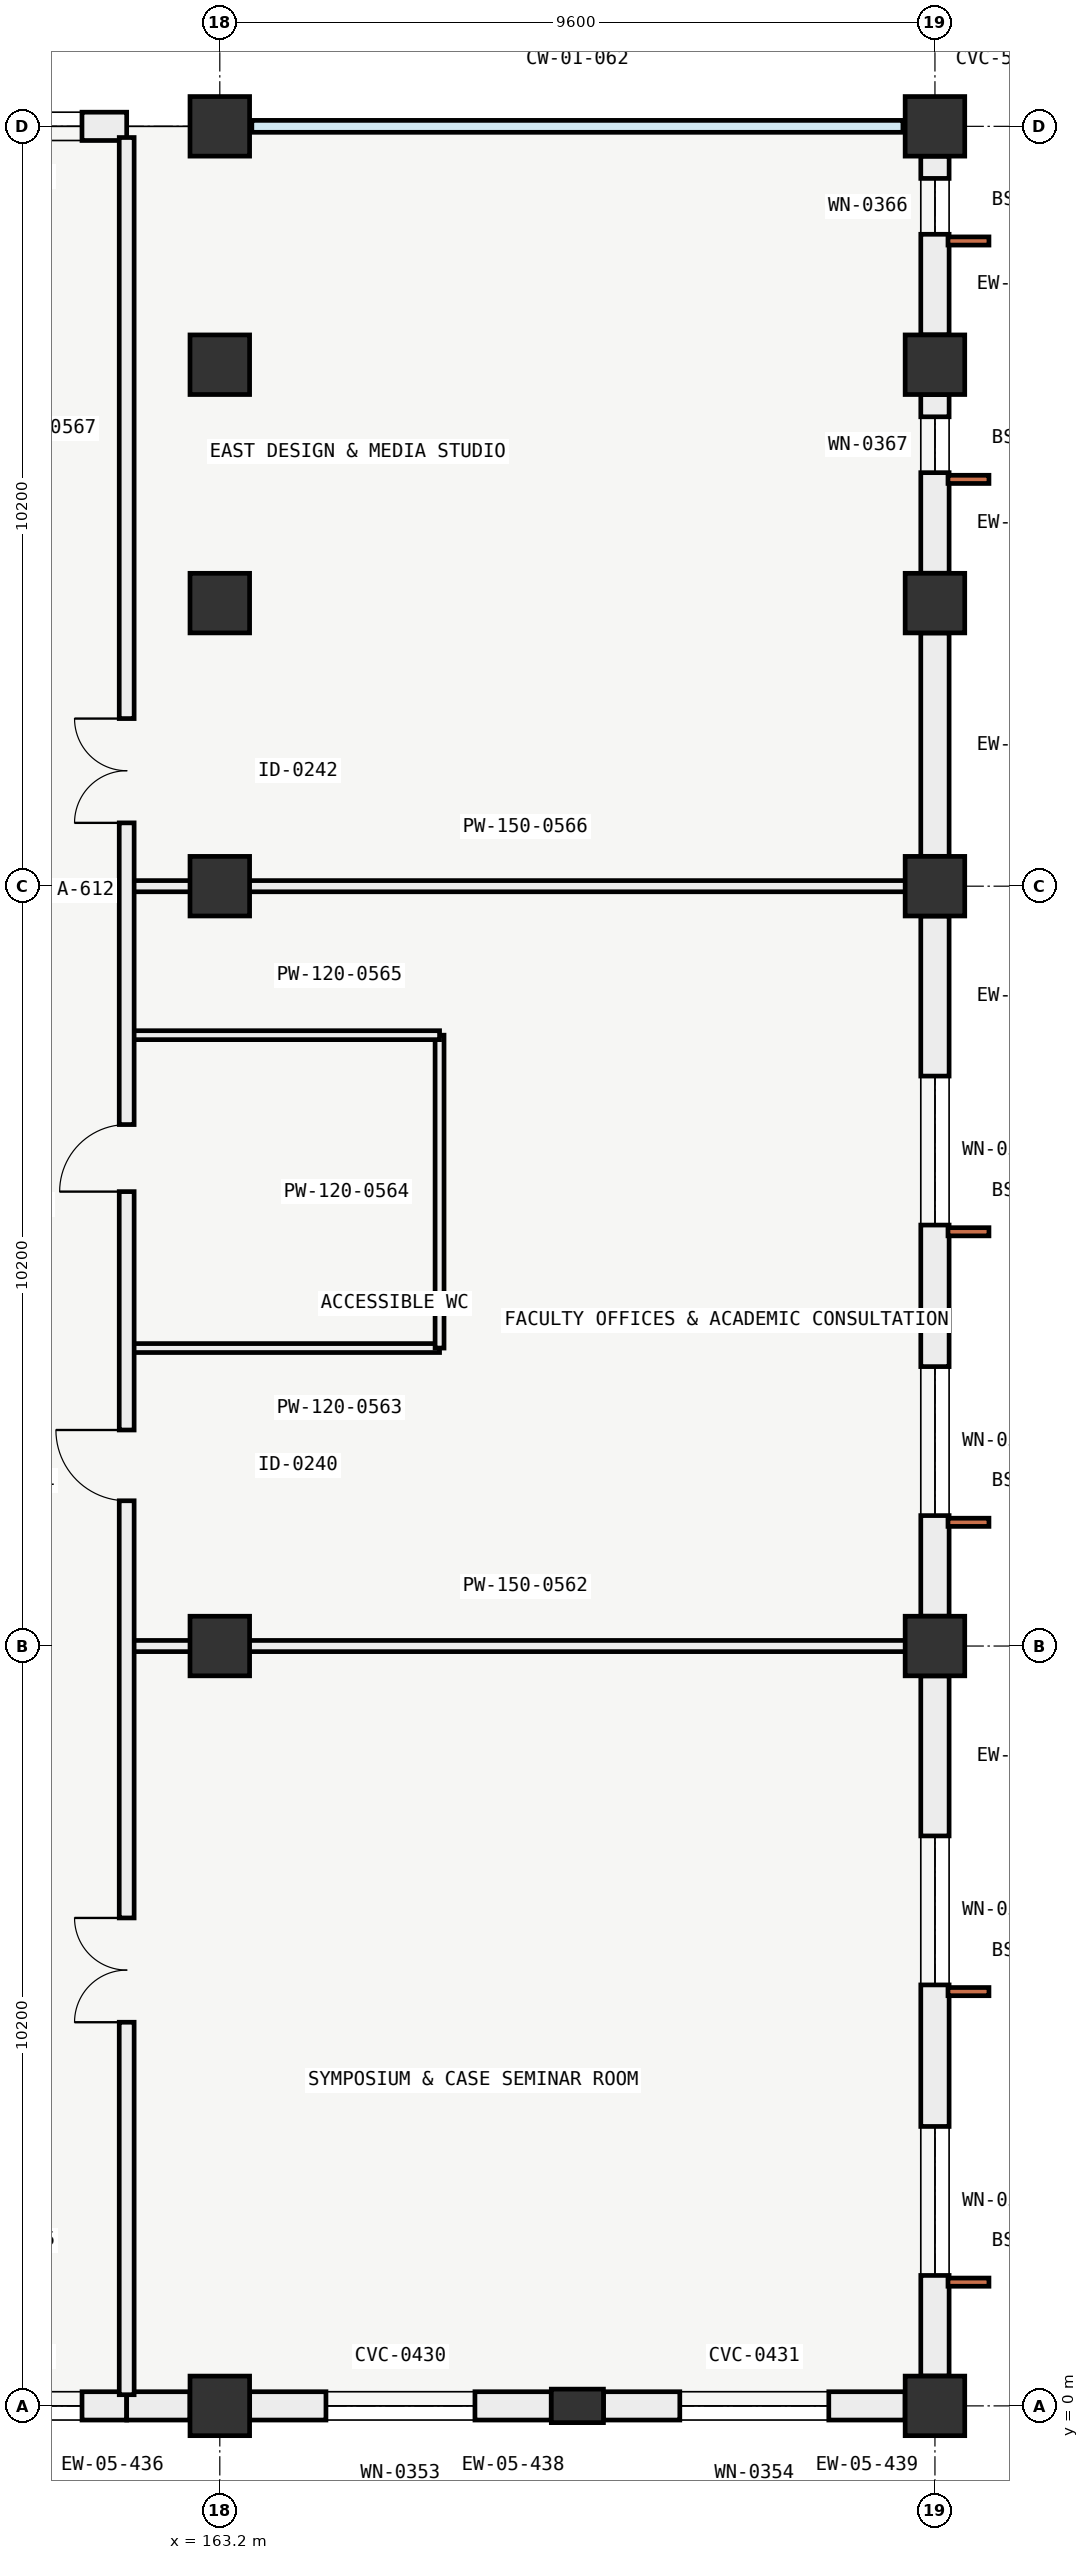
"""IFC4 building model, lengths in metres.
Left out: names, types, materials, properties, quantities, classifications, styles, units other than length and angle.
Written with IfcOpenShell. Run it as: python <this file> out.ifc"""

import sys

from ifc_helpers import new_model, si_unit, direction, frame, frame_2d, origin, origin_2d, place, context, subcontext, project, spatial, rectangle, extrude, element, fill, save


model = new_model("IFC4")
c1 = context("Model", 3, precision=1e-05, world=origin(), true_north=direction((0.0, 1.0)))
c2 = subcontext(c1, "Body", "Model", "MODEL_VIEW")
j1 = project(units=[si_unit("LENGTHUNIT", "METRE"), si_unit("PLANEANGLEUNIT", "RADIAN")], contexts=[c1])
p1 = place(None, origin())
s1 = spatial("IfcSite", under=j1, at=p1, CompositionType="ELEMENT")
p2 = place(p1, origin())
s2 = spatial("IfcBuilding", under=s1, at=p2, CompositionType="ELEMENT")
p3 = place(p2, frame((0.0, 0.0, 5.4)))
s3 = spatial("IfcBuildingStorey", under=s2, at=p3, CompositionType="ELEMENT", Elevation=5.4)
for number, where, z_axis, x_axis in (
    (1, (163.2, 0.0, 0.0), (0.0, 0.0, 1.0), (1.0, 0.0, 0.0)),
    (2, (163.2, 10.2, 0.0), (0.0, 0.0, 1.0), (1.0, 0.0, 0.0)),
    (3, (163.2, 20.4, 0.0), (0.0, 0.0, 1.0), (1.0, 0.0, 0.0)),
    (4, (163.2, 24.2, 0.0), (0.0, 0.0, 1.0), (1.0, 0.0, 0.0)),
    (5, (163.2, 27.4, 0.0), (0.0, 0.0, 1.0), (1.0, 0.0, 0.0)),
    (6, (163.2, 30.6, 0.0), (0.0, 0.0, 1.0), (1.0, 0.0, 0.0)),
    (7, (172.8, 0.0, 0.0), (0.0, 0.0, 1.0), (1.0, 0.0, 0.0)),
    (8, (172.8, 10.2, 0.0), (0.0, 0.0, 1.0), (1.0, 0.0, 0.0)),
    (9, (172.8, 20.4, 0.0), (0.0, 0.0, 1.0), (1.0, 0.0, 0.0)),
    (10, (172.8, 24.2, 0.0), (0.0, 0.0, 1.0), (1.0, 0.0, 0.0)),
    (11, (172.8, 27.4, 0.0), (0.0, 0.0, 1.0), (1.0, 0.0, 0.0)),
    (12, (172.8, 30.6, 0.0), (0.0, 0.0, 1.0), (1.0, 0.0, 0.0)),
):
    element("IfcColumn", number, at=place(p3, frame(where, z_axis=z_axis, x_axis=x_axis)), inside=s3, PredefinedType="COLUMN", context=c2, shape_type="SweptSolid", body=[
        extrude(rectangle(XDim=0.8, YDim=0.8, at=origin_2d()), origin(), (0.0, 0.0, 1.0), 4.2),
    ])
p4 = place(p3, frame((168.0, 0.0, 0.0), z_axis=(0.0, 0.0, 1.0), x_axis=(0.0, 1.0, 0.0)))
e13 = element("IfcColumn", 13, at=p4, inside=s3, PredefinedType="PILASTER", context=c2, shape_type="SweptSolid", body=[
    extrude(rectangle(XDim=0.45, YDim=0.7, at=origin_2d()), origin(), (0.0, 0.0, 1.0), 4.2),
])
p5 = place(p3, frame((161.95, 0.0, 0.0), z_axis=(0.0, 0.0, 1.0), x_axis=(-1.0, 0.0, 0.0)))
e14 = element("IfcWall", 14, at=p5, inside=s3, PredefinedType="SOLIDWALL", context=c2, shape_type="SweptSolid", body=[
    extrude(rectangle(XDim=3.199, YDim=0.38, at=frame_2d((1.6, 0.0))), origin(), (0.0, 0.0, 1.0), 3.25),
])
p6 = place(p5, frame((0.6, 0.0, 0.75)))
e15 = element("IfcOpeningElement", 15, at=p6, cuts=e14, PredefinedType="OPENING", context=c2, shape_type="SweptSolid", body=[
    extrude(rectangle(XDim=2.0, YDim=1.35, at=frame_2d((1.0, 0.675))), frame((0.0, 0.2, 0.0), z_axis=(0.0, -1.0, 0.0), x_axis=(1.0, 0.0, 0.0)), (0.0, 0.0, 1.0), 0.4),
])
p7 = place(p3, frame((162.799, 0.0, 0.0), z_axis=(0.0, 0.0, 1.0), x_axis=(-1.0, 0.0, 0.0)))
e16 = element("IfcWall", 16, at=p7, inside=s3, PredefinedType="SOLIDWALL", context=c2, shape_type="SweptSolid", body=[
    extrude(rectangle(XDim=0.849, YDim=0.38, at=frame_2d((0.425, 0.0))), origin(), (0.0, 0.0, 1.0), 3.25),
])
p8 = place(p3, frame((167.649, 0.0, 0.0), z_axis=(0.0, 0.0, 1.0), x_axis=(-1.0, 0.0, 0.0)))
e17 = element("IfcWall", 17, at=p8, inside=s3, PredefinedType="SOLIDWALL", context=c2, shape_type="SweptSolid", body=[
    extrude(rectangle(XDim=4.048, YDim=0.38, at=frame_2d((2.024, 0.0))), origin(), (0.0, 0.0, 1.0), 3.25),
])
p9 = place(p8, frame((1.024, 0.0, 0.85)))
e18 = element("IfcOpeningElement", 18, at=p9, cuts=e17, PredefinedType="OPENING", context=c2, shape_type="SweptSolid", body=[
    extrude(rectangle(XDim=2.0, YDim=1.35, at=frame_2d((1.0, 0.675))), frame((0.0, 0.2, 0.0), z_axis=(0.0, -1.0, 0.0), x_axis=(1.0, 0.0, 0.0)), (0.0, 0.0, 1.0), 0.4),
])
p10 = place(p3, frame((172.399, 0.0, 0.0), z_axis=(0.0, 0.0, 1.0), x_axis=(-1.0, 0.0, 0.0)))
e19 = element("IfcWall", 19, at=p10, inside=s3, PredefinedType="SOLIDWALL", context=c2, shape_type="SweptSolid", body=[
    extrude(rectangle(XDim=4.048, YDim=0.38, at=frame_2d((2.024, 0.0))), origin(), (0.0, 0.0, 1.0), 3.25),
])
p11 = place(p10, frame((1.024, 0.0, 0.85)))
e20 = element("IfcOpeningElement", 20, at=p11, cuts=e19, PredefinedType="OPENING", context=c2, shape_type="SweptSolid", body=[
    extrude(rectangle(XDim=2.0, YDim=1.35, at=frame_2d((1.0, 0.675))), frame((0.0, 0.2, 0.0), z_axis=(0.0, -1.0, 0.0), x_axis=(1.0, 0.0, 0.0)), (0.0, 0.0, 1.0), 0.4),
])
p12 = place(p3, frame((172.8, 9.799, 0.0), z_axis=(0.0, 0.0, 1.0), x_axis=(0.0, -1.0, 0.0)))
e21 = element("IfcWall", 21, at=p12, inside=s3, PredefinedType="SOLIDWALL", context=c2, shape_type="SweptSolid", body=[
    extrude(rectangle(XDim=9.398, YDim=0.38, at=frame_2d((4.699, 0.0))), origin(), (0.0, 0.0, 1.0), 3.25),
])
p13 = place(p12, frame((6.048, 0.0, 0.85)))
e22 = element("IfcOpeningElement", 22, at=p13, cuts=e21, PredefinedType="OPENING", context=c2, shape_type="SweptSolid", body=[
    extrude(rectangle(XDim=2.0, YDim=1.35, at=frame_2d((1.0, 0.675))), frame((0.0, 0.2, 0.0), z_axis=(0.0, -1.0, 0.0), x_axis=(1.0, 0.0, 0.0)), (0.0, 0.0, 1.0), 0.4),
])
p14 = place(p12, frame((2.148, 0.0, 0.85)))
e23 = element("IfcOpeningElement", 23, at=p14, cuts=e21, PredefinedType="OPENING", context=c2, shape_type="SweptSolid", body=[
    extrude(rectangle(XDim=2.0, YDim=1.35, at=frame_2d((1.0, 0.675))), frame((0.0, 0.2, 0.0), z_axis=(0.0, -1.0, 0.0), x_axis=(1.0, 0.0, 0.0)), (0.0, 0.0, 1.0), 0.4),
])
p15 = place(p3, frame((172.8, 19.999, 0.0), z_axis=(0.0, 0.0, 1.0), x_axis=(0.0, -1.0, 0.0)))
e24 = element("IfcWall", 24, at=p15, inside=s3, PredefinedType="SOLIDWALL", context=c2, shape_type="SweptSolid", body=[
    extrude(rectangle(XDim=9.398, YDim=0.38, at=frame_2d((4.699, 0.0))), origin(), (0.0, 0.0, 1.0), 3.25),
])
p16 = place(p15, frame((6.048, 0.0, 0.85)))
e25 = element("IfcOpeningElement", 25, at=p16, cuts=e24, PredefinedType="OPENING", context=c2, shape_type="SweptSolid", body=[
    extrude(rectangle(XDim=2.0, YDim=1.35, at=frame_2d((1.0, 0.675))), frame((0.0, 0.2, 0.0), z_axis=(0.0, -1.0, 0.0), x_axis=(1.0, 0.0, 0.0)), (0.0, 0.0, 1.0), 0.4),
])
p17 = place(p15, frame((2.148, 0.0, 0.85)))
e26 = element("IfcOpeningElement", 26, at=p17, cuts=e24, PredefinedType="OPENING", context=c2, shape_type="SweptSolid", body=[
    extrude(rectangle(XDim=2.0, YDim=1.35, at=frame_2d((1.0, 0.675))), frame((0.0, 0.2, 0.0), z_axis=(0.0, -1.0, 0.0), x_axis=(1.0, 0.0, 0.0)), (0.0, 0.0, 1.0), 0.4),
])
p18 = place(p3, frame((172.8, 30.199, 0.0), z_axis=(0.0, 0.0, 1.0), x_axis=(0.0, -1.0, 0.0)))
e27 = element("IfcWall", 27, at=p18, inside=s3, PredefinedType="SOLIDWALL", context=c2, shape_type="SweptSolid", body=[
    extrude(rectangle(XDim=2.398, YDim=0.38, at=frame_2d((1.199, 0.0))), origin(), (0.0, 0.0, 1.0), 3.25),
])
p19 = place(p18, frame((0.298, 0.0, 0.85)))
e28 = element("IfcOpeningElement", 28, at=p19, cuts=e27, PredefinedType="OPENING", context=c2, shape_type="SweptSolid", body=[
    extrude(rectangle(XDim=0.75, YDim=1.1, at=frame_2d((0.375, 0.55))), frame((0.0, 0.2, 0.0), z_axis=(0.0, -1.0, 0.0), x_axis=(1.0, 0.0, 0.0)), (0.0, 0.0, 1.0), 0.4),
])
p20 = place(p3, frame((172.8, 26.999, 0.0), z_axis=(0.0, 0.0, 1.0), x_axis=(0.0, -1.0, 0.0)))
e29 = element("IfcWall", 29, at=p20, inside=s3, PredefinedType="SOLIDWALL", context=c2, shape_type="SweptSolid", body=[
    extrude(rectangle(XDim=2.398, YDim=0.38, at=frame_2d((1.199, 0.0))), origin(), (0.0, 0.0, 1.0), 3.25),
])
p21 = place(p20, frame((0.298, 0.0, 0.85)))
e30 = element("IfcOpeningElement", 30, at=p21, cuts=e29, PredefinedType="OPENING", context=c2, shape_type="SweptSolid", body=[
    extrude(rectangle(XDim=0.75, YDim=1.1, at=frame_2d((0.375, 0.55))), frame((0.0, 0.2, 0.0), z_axis=(0.0, -1.0, 0.0), x_axis=(1.0, 0.0, 0.0)), (0.0, 0.0, 1.0), 0.4),
])
p22 = place(p3, frame((172.8, 23.799, 0.0), z_axis=(0.0, 0.0, 1.0), x_axis=(0.0, -1.0, 0.0)))
e31 = element("IfcWall", 31, at=p22, inside=s3, PredefinedType="SOLIDWALL", context=c2, shape_type="SweptSolid", body=[
    extrude(rectangle(XDim=2.998, YDim=0.38, at=frame_2d((1.499, 0.0))), origin(), (0.0, 0.0, 1.0), 3.25),
])
p23 = place(p3, frame((158.75, 30.6, 0.0), z_axis=(0.0, 0.0, 1.0), x_axis=(1.0, 0.0, 0.0)))
e32 = element("IfcWall", 32, at=p23, inside=s3, PredefinedType="SOLIDWALL", context=c2, shape_type="SweptSolid", body=[
    extrude(rectangle(XDim=3.2, YDim=0.38, at=frame_2d((1.6, 0.0))), origin(), (0.0, 0.0, 1.0), 3.25),
])
p24 = place(p23, frame((0.6, 0.0, 0.75)))
e33 = element("IfcOpeningElement", 33, at=p24, cuts=e32, PredefinedType="OPENING", context=c2, shape_type="SweptSolid", body=[
    extrude(rectangle(XDim=2.0, YDim=1.35, at=frame_2d((1.0, 0.675))), frame((0.0, 0.2, 0.0), z_axis=(0.0, -1.0, 0.0), x_axis=(1.0, 0.0, 0.0)), (0.0, 0.0, 1.0), 0.4),
])
p25 = place(p3, frame((161.95, 10.2, 0.0), z_axis=(0.0, 0.0, 1.0), x_axis=(1.0, 0.0, 0.0)))
e34 = element("IfcWall", 34, at=p25, inside=s3, PredefinedType="PARTITIONING", context=c2, shape_type="SweptSolid", body=[
    extrude(rectangle(XDim=10.7, YDim=0.15, at=frame_2d((5.35, 0.0))), origin(), (0.0, 0.0, 1.0), 3.15),
])
p26 = place(p3, frame((161.95, 14.2, 0.0), z_axis=(0.0, 0.0, 1.0), x_axis=(1.0, 0.0, 0.0)))
e35 = element("IfcWall", 35, at=p26, inside=s3, PredefinedType="PARTITIONING", context=c2, shape_type="SweptSolid", body=[
    extrude(rectangle(XDim=4.2, YDim=0.12, at=frame_2d((2.1, 0.0))), origin(), (0.0, 0.0, 1.0), 3.25),
])
p27 = place(p3, frame((166.15, 14.2, 0.0), z_axis=(0.0, 0.0, 1.0), x_axis=(0.0, 1.0, 0.0)))
e36 = element("IfcWall", 36, at=p27, inside=s3, PredefinedType="PARTITIONING", context=c2, shape_type="SweptSolid", body=[
    extrude(rectangle(XDim=4.2, YDim=0.12, at=frame_2d((2.1, 0.0))), origin(), (0.0, 0.0, 1.0), 3.85),
])
p28 = place(p3, frame((161.95, 18.4, 0.0), z_axis=(0.0, 0.0, 1.0), x_axis=(1.0, 0.0, 0.0)))
e37 = element("IfcWall", 37, at=p28, inside=s3, PredefinedType="PARTITIONING", context=c2, shape_type="SweptSolid", body=[
    extrude(rectangle(XDim=4.2, YDim=0.12, at=frame_2d((2.1, 0.0))), origin(), (0.0, 0.0, 1.0), 3.25),
])
p29 = place(p3, frame((161.95, 20.4, 0.0), z_axis=(0.0, 0.0, 1.0), x_axis=(1.0, 0.0, 0.0)))
e38 = element("IfcWall", 38, at=p29, inside=s3, PredefinedType="PARTITIONING", context=c2, shape_type="SweptSolid", body=[
    extrude(rectangle(XDim=10.7, YDim=0.15, at=frame_2d((5.35, 0.0))), origin(), (0.0, 0.0, 1.0), 3.2),
])
p30 = place(p3, frame((161.95, 0.15, 0.0), z_axis=(0.0, 0.0, 1.0), x_axis=(0.0, 1.0, 0.0)))
e39 = element("IfcWall", 39, at=p30, inside=s3, PredefinedType="PARTITIONING", context=c2, shape_type="SweptSolid", body=[
    extrude(rectangle(XDim=30.3, YDim=0.2, at=frame_2d((15.15, 0.0))), origin(), (0.0, 0.0, 1.0), 3.15),
])
p31 = place(p30, frame((5.0, 0.0, 0.0)))
e40 = element("IfcOpeningElement", 40, at=p31, cuts=e39, PredefinedType="OPENING", context=c2, shape_type="SweptSolid", body=[
    extrude(rectangle(XDim=1.4, YDim=2.2, at=frame_2d((0.7, 1.1))), frame((0.0, 0.11, 0.0), z_axis=(0.0, -1.0, 0.0), x_axis=(1.0, 0.0, 0.0)), (0.0, 0.0, 1.0), 0.22),
])
p32 = place(p30, frame((12.0, 0.0, 0.0)))
e41 = element("IfcOpeningElement", 41, at=p32, cuts=e39, PredefinedType="OPENING", context=c2, shape_type="SweptSolid", body=[
    extrude(rectangle(XDim=0.95, YDim=2.1, at=frame_2d((0.475, 1.05))), frame((0.0, 0.11, 0.0), z_axis=(0.0, -1.0, 0.0), x_axis=(1.0, 0.0, 0.0)), (0.0, 0.0, 1.0), 0.22),
])
p33 = place(p30, frame((16.15, 0.0, 0.0)))
e42 = element("IfcOpeningElement", 42, at=p33, cuts=e39, PredefinedType="OPENING", context=c2, shape_type="SweptSolid", body=[
    extrude(rectangle(XDim=0.9, YDim=2.05, at=frame_2d((0.45, 1.025))), frame((0.0, 0.11, 0.0), z_axis=(0.0, -1.0, 0.0), x_axis=(1.0, 0.0, 0.0)), (0.0, 0.0, 1.0), 0.22),
])
p34 = place(p30, frame((21.1, 0.0, 0.0)))
e43 = element("IfcOpeningElement", 43, at=p34, cuts=e39, PredefinedType="OPENING", context=c2, shape_type="SweptSolid", body=[
    extrude(rectangle(XDim=1.4, YDim=2.2, at=frame_2d((0.7, 1.1))), frame((0.0, 0.11, 0.0), z_axis=(0.0, -1.0, 0.0), x_axis=(1.0, 0.0, 0.0)), (0.0, 0.0, 1.0), 0.22),
])
p35 = place(p6, origin())
e44 = element("IfcWindow", 44, at=p35, inside=s3, PartitioningType="SINGLE_PANEL", PredefinedType="WINDOW", context=c2, shape_type="SweptSolid", body=[
    extrude(rectangle(XDim=2.0, YDim=1.35, at=frame_2d((1.0, 0.675))), frame((0.0, 0.03, 0.0), z_axis=(0.0, -1.0, 0.0), x_axis=(1.0, 0.0, 0.0)), (0.0, 0.0, 1.0), 0.06),
])
fill(e15, e44)
p36 = place(p9, origin())
e45 = element("IfcWindow", 45, at=p36, inside=s3, PartitioningType="SINGLE_PANEL", PredefinedType="WINDOW", context=c2, shape_type="SweptSolid", body=[
    extrude(rectangle(XDim=2.0, YDim=1.35, at=frame_2d((1.0, 0.675))), frame((0.0, 0.03, 0.0), z_axis=(0.0, -1.0, 0.0), x_axis=(1.0, 0.0, 0.0)), (0.0, 0.0, 1.0), 0.06),
])
fill(e18, e45)
p37 = place(p11, origin())
e46 = element("IfcWindow", 46, at=p37, inside=s3, PartitioningType="SINGLE_PANEL", PredefinedType="WINDOW", context=c2, shape_type="SweptSolid", body=[
    extrude(rectangle(XDim=2.0, YDim=1.35, at=frame_2d((1.0, 0.675))), frame((0.0, 0.03, 0.0), z_axis=(0.0, -1.0, 0.0), x_axis=(1.0, 0.0, 0.0)), (0.0, 0.0, 1.0), 0.06),
])
fill(e20, e46)
p38 = place(p13, origin())
e47 = element("IfcWindow", 47, at=p38, inside=s3, PartitioningType="SINGLE_PANEL", PredefinedType="WINDOW", context=c2, shape_type="SweptSolid", body=[
    extrude(rectangle(XDim=2.0, YDim=1.35, at=frame_2d((1.0, 0.675))), frame((0.0, 0.03, 0.0), z_axis=(0.0, -1.0, 0.0), x_axis=(1.0, 0.0, 0.0)), (0.0, 0.0, 1.0), 0.06),
])
fill(e22, e47)
p39 = place(p14, origin())
e48 = element("IfcWindow", 48, at=p39, inside=s3, PartitioningType="SINGLE_PANEL", PredefinedType="WINDOW", context=c2, shape_type="SweptSolid", body=[
    extrude(rectangle(XDim=2.0, YDim=1.35, at=frame_2d((1.0, 0.675))), frame((0.0, 0.03, 0.0), z_axis=(0.0, -1.0, 0.0), x_axis=(1.0, 0.0, 0.0)), (0.0, 0.0, 1.0), 0.06),
])
fill(e23, e48)
p40 = place(p16, origin())
e49 = element("IfcWindow", 49, at=p40, inside=s3, PartitioningType="SINGLE_PANEL", PredefinedType="WINDOW", context=c2, shape_type="SweptSolid", body=[
    extrude(rectangle(XDim=2.0, YDim=1.35, at=frame_2d((1.0, 0.675))), frame((0.0, 0.03, 0.0), z_axis=(0.0, -1.0, 0.0), x_axis=(1.0, 0.0, 0.0)), (0.0, 0.0, 1.0), 0.06),
])
fill(e25, e49)
p41 = place(p17, origin())
e50 = element("IfcWindow", 50, at=p41, inside=s3, PartitioningType="SINGLE_PANEL", PredefinedType="WINDOW", context=c2, shape_type="SweptSolid", body=[
    extrude(rectangle(XDim=2.0, YDim=1.35, at=frame_2d((1.0, 0.675))), frame((0.0, 0.03, 0.0), z_axis=(0.0, -1.0, 0.0), x_axis=(1.0, 0.0, 0.0)), (0.0, 0.0, 1.0), 0.06),
])
fill(e26, e50)
p42 = place(p19, origin())
e51 = element("IfcWindow", 51, at=p42, inside=s3, PartitioningType="SINGLE_PANEL", PredefinedType="WINDOW", context=c2, shape_type="SweptSolid", body=[
    extrude(rectangle(XDim=0.75, YDim=1.1, at=frame_2d((0.375, 0.55))), frame((0.0, 0.03, 0.0), z_axis=(0.0, -1.0, 0.0), x_axis=(1.0, 0.0, 0.0)), (0.0, 0.0, 1.0), 0.06),
])
fill(e28, e51)
p43 = place(p21, origin())
e52 = element("IfcWindow", 52, at=p43, inside=s3, PartitioningType="SINGLE_PANEL", PredefinedType="WINDOW", context=c2, shape_type="SweptSolid", body=[
    extrude(rectangle(XDim=0.75, YDim=1.1, at=frame_2d((0.375, 0.55))), frame((0.0, 0.03, 0.0), z_axis=(0.0, -1.0, 0.0), x_axis=(1.0, 0.0, 0.0)), (0.0, 0.0, 1.0), 0.06),
])
fill(e30, e52)
p44 = place(p24, origin())
e53 = element("IfcWindow", 53, at=p44, inside=s3, PartitioningType="SINGLE_PANEL", PredefinedType="WINDOW", context=c2, shape_type="SweptSolid", body=[
    extrude(rectangle(XDim=2.0, YDim=1.35, at=frame_2d((1.0, 0.675))), frame((0.0, 0.03, 0.0), z_axis=(0.0, -1.0, 0.0), x_axis=(1.0, 0.0, 0.0)), (0.0, 0.0, 1.0), 0.06),
])
fill(e33, e53)
p45 = place(p31, origin())
e54 = element("IfcDoor", 54, at=p45, inside=s3, OperationType="DOUBLE_DOOR_SINGLE_SWING", PredefinedType="DOOR", context=c2, shape_type="SweptSolid", body=[
    extrude(rectangle(XDim=1.4, YDim=2.2, at=frame_2d((0.7, 1.1))), frame((0.0, 0.025, 0.0), z_axis=(0.0, -1.0, 0.0), x_axis=(1.0, 0.0, 0.0)), (0.0, 0.0, 1.0), 0.05),
])
fill(e40, e54)
p46 = place(p32, origin())
e55 = element("IfcDoor", 55, at=p46, inside=s3, OperationType="SINGLE_SWING_RIGHT", PredefinedType="DOOR", context=c2, shape_type="SweptSolid", body=[
    extrude(rectangle(XDim=0.95, YDim=2.1, at=frame_2d((0.475, 1.05))), frame((0.0, 0.025, 0.0), z_axis=(0.0, -1.0, 0.0), x_axis=(1.0, 0.0, 0.0)), (0.0, 0.0, 1.0), 0.05),
])
fill(e41, e55)
p47 = place(p33, origin())
e56 = element("IfcDoor", 56, at=p47, inside=s3, OperationType="SINGLE_SWING_LEFT", PredefinedType="DOOR", context=c2, shape_type="SweptSolid", body=[
    extrude(rectangle(XDim=0.9, YDim=2.05, at=frame_2d((0.45, 1.025))), frame((0.0, 0.025, 0.0), z_axis=(0.0, -1.0, 0.0), x_axis=(1.0, 0.0, 0.0)), (0.0, 0.0, 1.0), 0.05),
])
fill(e42, e56)
p48 = place(p34, origin())
e57 = element("IfcDoor", 57, at=p48, inside=s3, OperationType="DOUBLE_DOOR_SINGLE_SWING", PredefinedType="DOOR", context=c2, shape_type="SweptSolid", body=[
    extrude(rectangle(XDim=1.4, YDim=2.2, at=frame_2d((0.7, 1.1))), frame((0.0, 0.025, 0.0), z_axis=(0.0, -1.0, 0.0), x_axis=(1.0, 0.0, 0.0)), (0.0, 0.0, 1.0), 0.05),
])
fill(e43, e57)
save(model, sys.argv[1])
